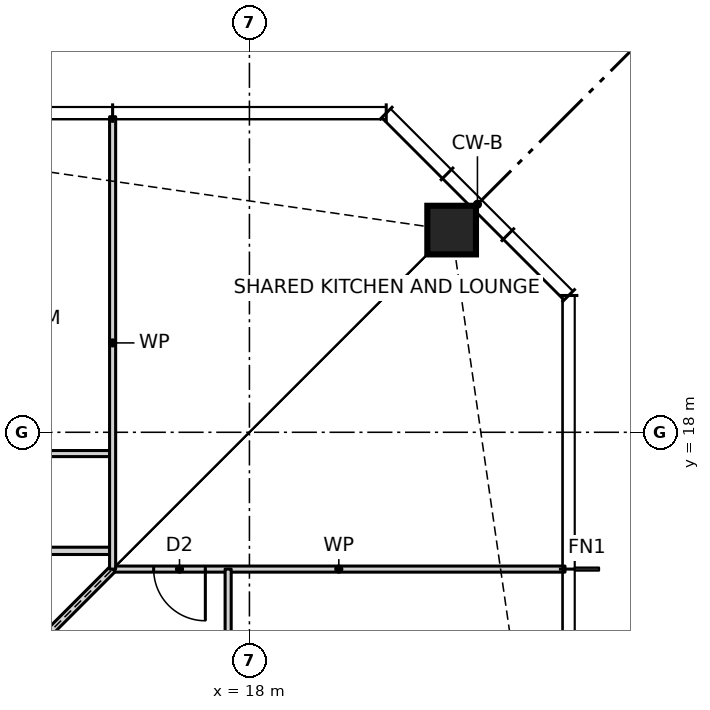
"""IFC4 building model, lengths in metres.
Left out: names, types, materials, properties, quantities, classifications, styles, units other than length and angle.
Written with IfcOpenShell. Run it as: python <this file> out.ifc"""

import sys

from ifc_helpers import new_model, si_unit, direction, frame, frame_2d, origin, origin_2d, place, context, subcontext, project, spatial, rectangle, hollow_rectangle, extrude, element, fill, save


model = new_model("IFC4")
c1 = context("Model", 3, precision=1e-05, world=origin(), true_north=direction((0.0, 1.0)))
c2 = subcontext(c1, "Body", "Model", "MODEL_VIEW")
j1 = project(units=[si_unit("LENGTHUNIT", "METRE"), si_unit("PLANEANGLEUNIT", "RADIAN")], contexts=[c1])
p1 = place(None, origin())
s1 = spatial("IfcSite", under=j1, at=p1, CompositionType="ELEMENT")
p2 = place(p1, origin())
s2 = spatial("IfcBuilding", under=s1, at=p2, CompositionType="ELEMENT")
p3 = place(p2, frame((0.0, 0.0, 39.5)))
s3 = spatial("IfcBuildingStorey", under=s2, at=p3, CompositionType="ELEMENT", Elevation=39.5)
p4 = place(p3, frame((21.326, 21.326, 0.0), z_axis=(0.0, 0.0, 1.0), x_axis=(1.0, 0.0, 0.0)))
e1 = element("IfcColumn", 1, at=p4, inside=s3, PredefinedType="COLUMN", context=c2, shape_type="SweptSolid", body=[
    extrude(hollow_rectangle(XDim=0.8, YDim=0.8, WallThickness=0.09, at=origin_2d()), origin(), (0.0, 0.0, 1.0), 3.5),
])
p5 = place(p3, frame((15.75, 15.75, 0.0), z_axis=(0.0, 0.0, 1.0), x_axis=(1.0, 0.0, 0.0)))
e2 = element("IfcWall", 2, at=p5, inside=s3, PredefinedType="PARTITIONING", context=c2, shape_type="SweptSolid", body=[
    extrude(rectangle(XDim=7.44, YDim=0.1, at=frame_2d((3.72, 0.0))), origin(), (0.0, 0.0, 1.0), 3.27),
])
p6 = place(p5, frame((0.675, 0.0, 0.0)))
e3 = element("IfcOpeningElement", 3, at=p6, cuts=e2, PredefinedType="OPENING", context=c2, shape_type="SweptSolid", body=[
    extrude(rectangle(XDim=0.85, YDim=2.1, at=frame_2d((0.425, 1.05))), frame((0.0, 0.06, 0.0), z_axis=(0.0, -1.0, 0.0), x_axis=(1.0, 0.0, 0.0)), (0.0, 0.0, 1.0), 0.12),
])
p7 = place(p3, frame((10.15, 16.05, 0.0), z_axis=(0.0, 0.0, 1.0), x_axis=(1.0, 0.0, 0.0)))
e4 = element("IfcWall", 4, at=p7, inside=s3, PredefinedType="PARTITIONING", context=c2, shape_type="SweptSolid", body=[
    extrude(rectangle(XDim=5.6, YDim=0.12, at=frame_2d((2.8, 0.0))), origin(), (0.0, 0.0, 1.0), 3.27),
])
p8 = place(p7, frame((3.225, 0.0, 0.0)))
e5 = element("IfcOpeningElement", 5, at=p8, cuts=e4, PredefinedType="OPENING", context=c2, shape_type="SweptSolid", body=[
    extrude(rectangle(XDim=0.85, YDim=2.1, at=frame_2d((0.425, 1.05))), frame((0.0, 0.07, 0.0), z_axis=(0.0, -1.0, 0.0), x_axis=(1.0, 0.0, 0.0)), (0.0, 0.0, 1.0), 0.14),
])
p9 = place(p3, frame((-15.75, 17.65, 0.0), z_axis=(0.0, 0.0, 1.0), x_axis=(1.0, 0.0, 0.0)))
e6 = element("IfcWall", 6, at=p9, inside=s3, PredefinedType="PARTITIONING", context=c2, shape_type="SweptSolid", body=[
    extrude(rectangle(XDim=31.5, YDim=0.1, at=frame_2d((15.75, 0.0))), origin(), (0.0, 0.0, 1.0), 3.27),
])
p10 = place(p9, frame((28.8, 0.0, 0.0)))
e7 = element("IfcOpeningElement", 7, at=p10, cuts=e6, PredefinedType="OPENING", context=c2, shape_type="SweptSolid", body=[
    extrude(rectangle(XDim=0.9, YDim=2.1, at=frame_2d((0.45, 1.05))), frame((0.0, 0.06, 0.0), z_axis=(0.0, -1.0, 0.0), x_axis=(1.0, 0.0, 0.0)), (0.0, 0.0, 1.0), 0.12),
])
p11 = place(p9, frame((24.3, 0.0, 0.0)))
e8 = element("IfcOpeningElement", 8, at=p11, cuts=e6, PredefinedType="OPENING", context=c2, shape_type="SweptSolid", body=[
    extrude(rectangle(XDim=0.9, YDim=2.1, at=frame_2d((0.45, 1.05))), frame((0.0, 0.06, 0.0), z_axis=(0.0, -1.0, 0.0), x_axis=(1.0, 0.0, 0.0)), (0.0, 0.0, 1.0), 0.12),
])
p12 = place(p9, frame((19.8, 0.0, 0.0)))
e9 = element("IfcOpeningElement", 9, at=p12, cuts=e6, PredefinedType="OPENING", context=c2, shape_type="SweptSolid", body=[
    extrude(rectangle(XDim=0.9, YDim=2.1, at=frame_2d((0.45, 1.05))), frame((0.0, 0.06, 0.0), z_axis=(0.0, -1.0, 0.0), x_axis=(1.0, 0.0, 0.0)), (0.0, 0.0, 1.0), 0.12),
])
p13 = place(p9, frame((15.3, 0.0, 0.0)))
e10 = element("IfcOpeningElement", 10, at=p13, cuts=e6, PredefinedType="OPENING", context=c2, shape_type="SweptSolid", body=[
    extrude(rectangle(XDim=0.9, YDim=2.1, at=frame_2d((0.45, 1.05))), frame((0.0, 0.06, 0.0), z_axis=(0.0, -1.0, 0.0), x_axis=(1.0, 0.0, 0.0)), (0.0, 0.0, 1.0), 0.12),
])
p14 = place(p9, frame((10.8, 0.0, 0.0)))
e11 = element("IfcOpeningElement", 11, at=p14, cuts=e6, PredefinedType="OPENING", context=c2, shape_type="SweptSolid", body=[
    extrude(rectangle(XDim=0.9, YDim=2.1, at=frame_2d((0.45, 1.05))), frame((0.0, 0.06, 0.0), z_axis=(0.0, -1.0, 0.0), x_axis=(1.0, 0.0, 0.0)), (0.0, 0.0, 1.0), 0.12),
])
p15 = place(p9, frame((6.3, 0.0, 0.0)))
e12 = element("IfcOpeningElement", 12, at=p15, cuts=e6, PredefinedType="OPENING", context=c2, shape_type="SweptSolid", body=[
    extrude(rectangle(XDim=0.9, YDim=2.1, at=frame_2d((0.45, 1.05))), frame((0.0, 0.06, 0.0), z_axis=(0.0, -1.0, 0.0), x_axis=(1.0, 0.0, 0.0)), (0.0, 0.0, 1.0), 0.12),
])
p16 = place(p9, frame((1.8, 0.0, 0.0)))
e13 = element("IfcOpeningElement", 13, at=p16, cuts=e6, PredefinedType="OPENING", context=c2, shape_type="SweptSolid", body=[
    extrude(rectangle(XDim=0.9, YDim=2.1, at=frame_2d((0.45, 1.05))), frame((0.0, 0.06, 0.0), z_axis=(0.0, -1.0, 0.0), x_axis=(1.0, 0.0, 0.0)), (0.0, 0.0, 1.0), 0.12),
])
p17 = place(p3, frame((11.6, 11.6, 0.0), z_axis=(0.0, 0.0, 1.0), x_axis=(0.707106781187, 0.707106781187, 0.0)))
e14 = element("IfcWall", 14, at=p17, inside=s3, PredefinedType="PARTITIONING", context=c2, shape_type="SweptSolid", body=[
    extrude(rectangle(XDim=5.869, YDim=0.12, at=frame_2d((2.935, 0.0))), origin(), (0.0, 0.0, 1.0), 2.343),
])
p18 = place(p3, frame((17.65, -11.25, 0.0), z_axis=(0.0, 0.0, 1.0), x_axis=(0.0, 1.0, 0.0)))
e15 = element("IfcWall", 15, at=p18, inside=s3, PredefinedType="PARTITIONING", context=c2, shape_type="SweptSolid", body=[
    extrude(rectangle(XDim=27.0, YDim=0.1, at=frame_2d((13.5, 0.0))), origin(), (0.0, 0.0, 1.0), 3.0),
])
p19 = place(p18, frame((1.8, 0.0, 0.0)))
e16 = element("IfcOpeningElement", 16, at=p19, cuts=e15, PredefinedType="OPENING", context=c2, shape_type="SweptSolid", body=[
    extrude(rectangle(XDim=0.9, YDim=2.1, at=frame_2d((0.45, 1.05))), frame((0.0, 0.06, 0.0), z_axis=(0.0, -1.0, 0.0), x_axis=(1.0, 0.0, 0.0)), (0.0, 0.0, 1.0), 0.12),
])
p20 = place(p18, frame((6.3, 0.0, 0.0)))
e17 = element("IfcOpeningElement", 17, at=p20, cuts=e15, PredefinedType="OPENING", context=c2, shape_type="SweptSolid", body=[
    extrude(rectangle(XDim=0.9, YDim=2.1, at=frame_2d((0.45, 1.05))), frame((0.0, 0.06, 0.0), z_axis=(0.0, -1.0, 0.0), x_axis=(1.0, 0.0, 0.0)), (0.0, 0.0, 1.0), 0.12),
])
p21 = place(p18, frame((10.8, 0.0, 0.0)))
e18 = element("IfcOpeningElement", 18, at=p21, cuts=e15, PredefinedType="OPENING", context=c2, shape_type="SweptSolid", body=[
    extrude(rectangle(XDim=0.9, YDim=2.1, at=frame_2d((0.45, 1.05))), frame((0.0, 0.06, 0.0), z_axis=(0.0, -1.0, 0.0), x_axis=(1.0, 0.0, 0.0)), (0.0, 0.0, 1.0), 0.12),
])
p22 = place(p18, frame((15.3, 0.0, 0.0)))
e19 = element("IfcOpeningElement", 19, at=p22, cuts=e15, PredefinedType="OPENING", context=c2, shape_type="SweptSolid", body=[
    extrude(rectangle(XDim=0.9, YDim=2.1, at=frame_2d((0.45, 1.05))), frame((0.0, 0.06, 0.0), z_axis=(0.0, -1.0, 0.0), x_axis=(1.0, 0.0, 0.0)), (0.0, 0.0, 1.0), 0.12),
])
p23 = place(p18, frame((19.8, 0.0, 0.0)))
e20 = element("IfcOpeningElement", 20, at=p23, cuts=e15, PredefinedType="OPENING", context=c2, shape_type="SweptSolid", body=[
    extrude(rectangle(XDim=0.9, YDim=2.1, at=frame_2d((0.45, 1.05))), frame((0.0, 0.06, 0.0), z_axis=(0.0, -1.0, 0.0), x_axis=(1.0, 0.0, 0.0)), (0.0, 0.0, 1.0), 0.12),
])
p24 = place(p18, frame((24.3, 0.0, 0.0)))
e21 = element("IfcOpeningElement", 21, at=p24, cuts=e15, PredefinedType="OPENING", context=c2, shape_type="SweptSolid", body=[
    extrude(rectangle(XDim=0.9, YDim=2.1, at=frame_2d((0.45, 1.05))), frame((0.0, 0.06, 0.0), z_axis=(0.0, -1.0, 0.0), x_axis=(1.0, 0.0, 0.0)), (0.0, 0.0, 1.0), 0.12),
])
p25 = place(p3, frame((15.75, 15.75, 0.0), z_axis=(0.0, 0.0, 1.0), x_axis=(0.0, 1.0, 0.0)))
e22 = element("IfcWall", 22, at=p25, inside=s3, PredefinedType="PARTITIONING", context=c2, shape_type="SweptSolid", body=[
    extrude(rectangle(XDim=7.44, YDim=0.1, at=frame_2d((3.72, 0.0))), origin(), (0.0, 0.0, 1.0), 3.27),
])
p26 = place(p6, frame((0.85, 0.0, 0.0), z_axis=(0.0, 0.0, 1.0), x_axis=(-1.0, 0.0, 0.0)))
e23 = element("IfcDoor", 23, at=p26, inside=s3, OperationType="SINGLE_SWING_LEFT", PredefinedType="DOOR", context=c2, shape_type="SweptSolid", body=[
    extrude(rectangle(XDim=0.85, YDim=2.1, at=frame_2d((0.425, 1.05))), frame((0.0, 0.025, 0.0), z_axis=(0.0, -1.0, 0.0), x_axis=(1.0, 0.0, 0.0)), (0.0, 0.0, 1.0), 0.05),
])
fill(e3, e23)
save(model, sys.argv[1])
